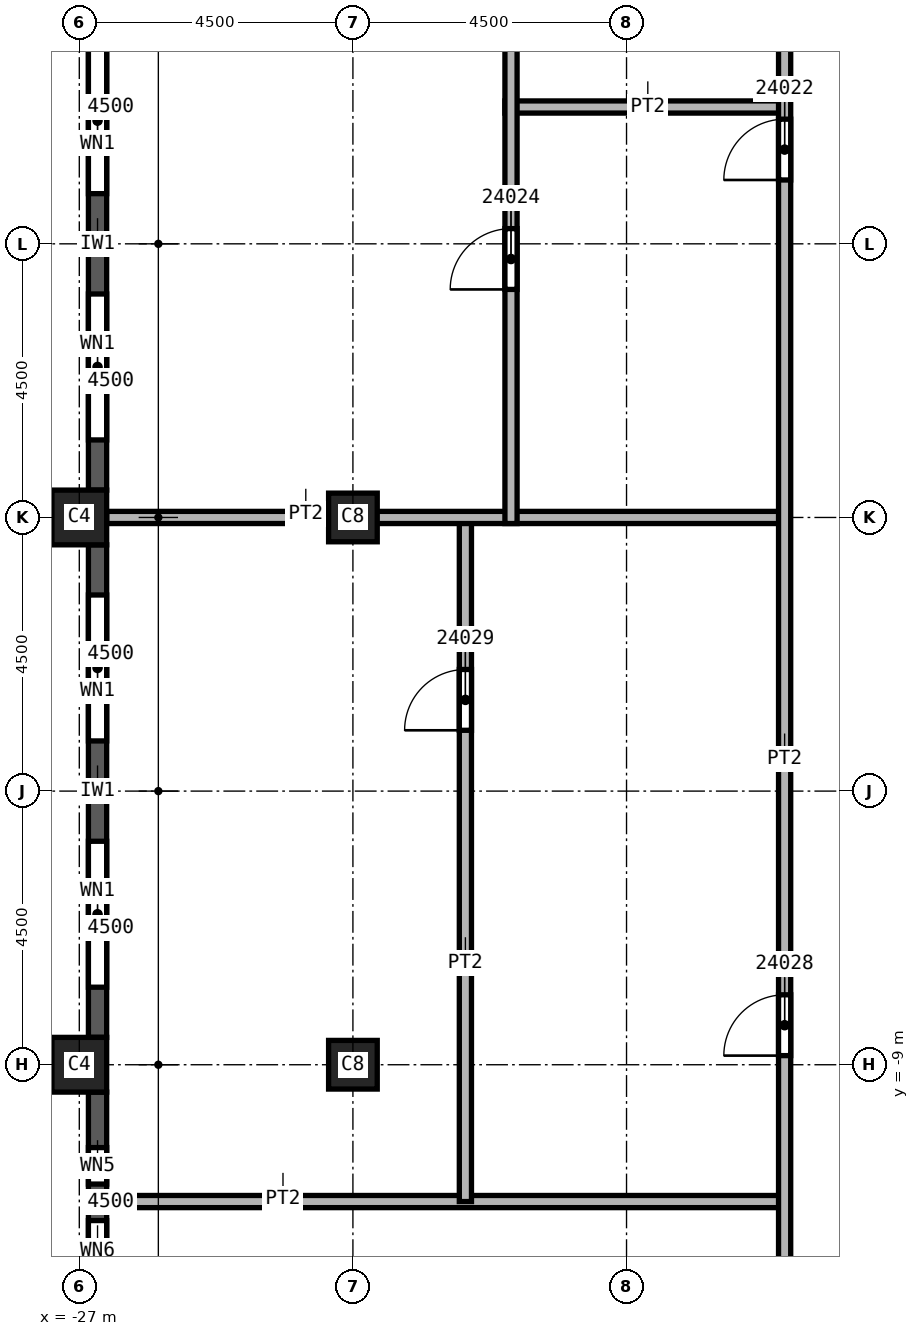
"""IFC4 building model, lengths in metres.
Left out: names, types, materials, properties, quantities, classifications, styles, units other than length and angle.
Written with IfcOpenShell. Run it as: python <this file> out.ifc"""

import sys

from ifc_helpers import new_model, si_unit, direction, frame, frame_2d, origin, origin_2d, place, context, subcontext, project, spatial, rectangle, extrude, element, fill, save


model = new_model("IFC4")
c1 = context("Model", 3, precision=1e-05, world=origin(), true_north=direction((0.0, 1.0)))
c2 = subcontext(c1, "Body", "Model", "MODEL_VIEW")
j1 = project(units=[si_unit("LENGTHUNIT", "METRE"), si_unit("PLANEANGLEUNIT", "RADIAN")], contexts=[c1])
p1 = place(None, origin())
s1 = spatial("IfcSite", under=j1, at=p1, CompositionType="ELEMENT")
p2 = place(p1, origin())
s2 = spatial("IfcBuilding", under=s1, at=p2, CompositionType="ELEMENT")
p3 = place(p2, frame((0.0, 0.0, 338.0)))
s3 = spatial("IfcBuildingStorey", under=s2, at=p3, CompositionType="ELEMENT", Elevation=338.0)
for number, where, z_axis, x_axis in (
    (1, (-22.5, 0.0, 0.0), (0.0, 0.0, 1.0), (1.0, 0.0, 0.0)),
    (2, (-22.5, -9.0, 0.0), (0.0, 0.0, 1.0), (1.0, 0.0, 0.0)),
):
    element("IfcColumn", number, at=place(p3, frame(where, z_axis=z_axis, x_axis=x_axis)), inside=s3, PredefinedType="COLUMN", context=c2, shape_type="SweptSolid", body=[
        extrude(rectangle(XDim=0.8, YDim=0.8, at=origin_2d()), origin(), (0.0, 0.0, 1.0), 3.74),
    ])
for number, where, z_axis, x_axis in (
    (3, (-27.0, 0.0, 0.0), (0.0, 0.0, 1.0), (0.0, 1.0, 0.0)),
    (4, (-27.0, -9.0, 0.0), (0.0, 0.0, 1.0), (0.0, 1.0, 0.0)),
):
    element("IfcColumn", number, at=place(p3, frame(where, z_axis=z_axis, x_axis=x_axis)), inside=s3, PredefinedType="COLUMN", context=c2, shape_type="SweptSolid", body=[
        extrude(rectangle(XDim=0.9, YDim=0.9, at=origin_2d()), origin(), (0.0, 0.0, 1.0), 3.74),
    ])
p4 = place(p3, frame((-26.7, 8.55, 0.0), z_axis=(0.0, 0.0, 1.0), x_axis=(0.0, -1.0, 0.0)))
e5 = element("IfcWall", 5, at=p4, inside=s3, PredefinedType="SOLIDWALL", context=c2, shape_type="SweptSolid", body=[
    extrude(rectangle(XDim=8.1, YDim=0.3, at=frame_2d((4.05, 0.0))), origin(), (0.0, 0.0, 1.0), 3.14),
])
p5 = place(p4, frame((0.825, 0.0, 0.8)))
e6 = element("IfcOpeningElement", 6, at=p5, cuts=e5, PredefinedType="OPENING", context=c2, shape_type="SweptSolid", body=[
    extrude(rectangle(XDim=2.4, YDim=1.95, at=frame_2d((1.2, 0.975))), frame((0.0, 0.15, 0.0), z_axis=(0.0, -1.0, 0.0), x_axis=(1.0, 0.0, 0.0)), (0.0, 0.0, 1.0), 0.3),
])
p6 = place(p4, frame((4.875, 0.0, 0.8)))
e7 = element("IfcOpeningElement", 7, at=p6, cuts=e5, PredefinedType="OPENING", context=c2, shape_type="SweptSolid", body=[
    extrude(rectangle(XDim=2.4, YDim=1.95, at=frame_2d((1.2, 0.975))), frame((0.0, 0.15, 0.0), z_axis=(0.0, -1.0, 0.0), x_axis=(1.0, 0.0, 0.0)), (0.0, 0.0, 1.0), 0.3),
])
p7 = place(p3, frame((-26.7, -0.45, 0.0), z_axis=(0.0, 0.0, 1.0), x_axis=(0.0, -1.0, 0.0)))
e8 = element("IfcWall", 8, at=p7, inside=s3, PredefinedType="SOLIDWALL", context=c2, shape_type="SweptSolid", body=[
    extrude(rectangle(XDim=8.1, YDim=0.3, at=frame_2d((4.05, 0.0))), origin(), (0.0, 0.0, 1.0), 3.14),
])
p8 = place(p7, frame((0.825, 0.0, 0.8)))
e9 = element("IfcOpeningElement", 9, at=p8, cuts=e8, PredefinedType="OPENING", context=c2, shape_type="SweptSolid", body=[
    extrude(rectangle(XDim=2.4, YDim=1.95, at=frame_2d((1.2, 0.975))), frame((0.0, 0.15, 0.0), z_axis=(0.0, -1.0, 0.0), x_axis=(1.0, 0.0, 0.0)), (0.0, 0.0, 1.0), 0.3),
])
p9 = place(p7, frame((4.875, 0.0, 0.8)))
e10 = element("IfcOpeningElement", 10, at=p9, cuts=e8, PredefinedType="OPENING", context=c2, shape_type="SweptSolid", body=[
    extrude(rectangle(XDim=2.4, YDim=1.95, at=frame_2d((1.2, 0.975))), frame((0.0, 0.15, 0.0), z_axis=(0.0, -1.0, 0.0), x_axis=(1.0, 0.0, 0.0)), (0.0, 0.0, 1.0), 0.3),
])
p10 = place(p3, frame((-26.7, -9.45, 0.0), z_axis=(0.0, 0.0, 1.0), x_axis=(0.0, -1.0, 0.0)))
e11 = element("IfcWall", 11, at=p10, inside=s3, PredefinedType="SOLIDWALL", context=c2, shape_type="SweptSolid", body=[
    extrude(rectangle(XDim=8.1, YDim=0.3, at=frame_2d((4.05, 0.0))), origin(), (0.0, 0.0, 1.0), 3.14),
])
p11 = place(p10, frame((0.913, 0.0, 0.8)))
e12 = element("IfcOpeningElement", 12, at=p11, cuts=e11, PredefinedType="OPENING", context=c2, shape_type="SweptSolid", body=[
    extrude(rectangle(XDim=0.6, YDim=1.95, at=frame_2d((0.3, 0.975))), frame((0.0, 0.15, 0.0), z_axis=(0.0, -1.0, 0.0), x_axis=(1.0, 0.0, 0.0)), (0.0, 0.0, 1.0), 0.3),
])
p12 = place(p10, frame((2.113, 0.0, 0.8)))
e13 = element("IfcOpeningElement", 13, at=p12, cuts=e11, PredefinedType="OPENING", context=c2, shape_type="SweptSolid", body=[
    extrude(rectangle(XDim=1.0, YDim=1.95, at=frame_2d((0.5, 0.975))), frame((0.0, 0.15, 0.0), z_axis=(0.0, -1.0, 0.0), x_axis=(1.0, 0.0, 0.0)), (0.0, 0.0, 1.0), 0.3),
])
p13 = place(p10, frame((4.988, 0.0, 0.8)))
e14 = element("IfcOpeningElement", 14, at=p13, cuts=e11, PredefinedType="OPENING", context=c2, shape_type="SweptSolid", body=[
    extrude(rectangle(XDim=1.0, YDim=1.95, at=frame_2d((0.5, 0.975))), frame((0.0, 0.15, 0.0), z_axis=(0.0, -1.0, 0.0), x_axis=(1.0, 0.0, 0.0)), (0.0, 0.0, 1.0), 0.3),
])
p14 = place(p10, frame((6.587, 0.0, 0.8)))
e15 = element("IfcOpeningElement", 15, at=p14, cuts=e11, PredefinedType="OPENING", context=c2, shape_type="SweptSolid", body=[
    extrude(rectangle(XDim=0.6, YDim=1.95, at=frame_2d((0.3, 0.975))), frame((0.0, 0.15, 0.0), z_axis=(0.0, -1.0, 0.0), x_axis=(1.0, 0.0, 0.0)), (0.0, 0.0, 1.0), 0.3),
])
p15 = place(p3, frame((-26.55, -11.25, 0.0), z_axis=(0.0, 0.0, 1.0), x_axis=(1.0, 0.0, 0.0)))
e16 = element("IfcWall", 16, at=p15, inside=s3, PredefinedType="PARTITIONING", context=c2, shape_type="SweptSolid", body=[
    extrude(rectangle(XDim=11.15, YDim=0.2, at=frame_2d((5.575, 0.0))), origin(), (0.0, 0.0, 1.0), 3.74),
])
p16 = place(p3, frame((-20.65, -11.25, 0.0), z_axis=(0.0, 0.0, 1.0), x_axis=(0.0, 1.0, 0.0)))
e17 = element("IfcWall", 17, at=p16, inside=s3, PredefinedType="PARTITIONING", context=c2, shape_type="SweptSolid", body=[
    extrude(rectangle(XDim=11.25, YDim=0.2, at=frame_2d((5.625, 0.0))), origin(), (0.0, 0.0, 1.0), 3.74),
])
p17 = place(p16, frame((7.75, 0.0, 0.0)))
e18 = element("IfcOpeningElement", 18, at=p17, cuts=e17, PredefinedType="OPENING", context=c2, shape_type="SweptSolid", body=[
    extrude(rectangle(XDim=1.0, YDim=2.1, at=frame_2d((0.5, 1.05))), frame((0.0, 0.1, 0.0), z_axis=(0.0, -1.0, 0.0), x_axis=(1.0, 0.0, 0.0)), (0.0, 0.0, 1.0), 0.2),
])
p18 = place(p3, frame((-15.4, 0.0, 0.0), z_axis=(0.0, 0.0, 1.0), x_axis=(-1.0, 0.0, 0.0)))
e19 = element("IfcWall", 19, at=p18, inside=s3, PredefinedType="PARTITIONING", context=c2, shape_type="SweptSolid", body=[
    extrude(rectangle(XDim=11.15, YDim=0.2, at=frame_2d((5.575, 0.0))), origin(), (0.0, 0.0, 1.0), 3.74),
])
p19 = place(p3, frame((-20.0, 6.75, 0.0), z_axis=(0.0, 0.0, 1.0), x_axis=(1.0, 0.0, 0.0)))
e20 = element("IfcWall", 20, at=p19, inside=s3, PredefinedType="PARTITIONING", context=c2, shape_type="SweptSolid", body=[
    extrude(rectangle(XDim=4.6, YDim=0.2, at=frame_2d((2.3, 0.0))), origin(), (0.0, 0.0, 1.0), 3.74),
])
p20 = place(p3, frame((-19.9, -0.1, 0.0), z_axis=(0.0, 0.0, 1.0), x_axis=(0.0, 1.0, 0.0)))
e21 = element("IfcWall", 21, at=p20, inside=s3, PredefinedType="PARTITIONING", context=c2, shape_type="SweptSolid", body=[
    extrude(rectangle(XDim=13.6, YDim=0.2, at=frame_2d((6.8, 0.0))), origin(), (0.0, 0.0, 1.0), 3.74),
])
p21 = place(p20, frame((3.85, 0.0, 0.0)))
e22 = element("IfcOpeningElement", 22, at=p21, cuts=e21, PredefinedType="OPENING", context=c2, shape_type="SweptSolid", body=[
    extrude(rectangle(XDim=1.0, YDim=2.1, at=frame_2d((0.5, 1.05))), frame((0.0, 0.1, 0.0), z_axis=(0.0, -1.0, 0.0), x_axis=(1.0, 0.0, 0.0)), (0.0, 0.0, 1.0), 0.2),
])
p22 = place(p3, frame((-15.4, -24.95, 0.0), z_axis=(0.0, 0.0, 1.0), x_axis=(0.0, 1.0, 0.0)))
e23 = element("IfcWall", 23, at=p22, inside=s3, PredefinedType="PARTITIONING", context=c2, shape_type="SweptSolid", body=[
    extrude(rectangle(XDim=38.55, YDim=0.2, at=frame_2d((19.275, 0.0))), origin(), (0.0, 0.0, 1.0), 3.74),
])
p23 = place(p22, frame((30.5, 0.0, 0.0)))
e24 = element("IfcOpeningElement", 24, at=p23, cuts=e23, PredefinedType="OPENING", context=c2, shape_type="SweptSolid", body=[
    extrude(rectangle(XDim=1.0, YDim=2.1, at=frame_2d((0.5, 1.05))), frame((0.0, 0.1, 0.0), z_axis=(0.0, -1.0, 0.0), x_axis=(1.0, 0.0, 0.0)), (0.0, 0.0, 1.0), 0.2),
])
p24 = place(p22, frame((36.35, 0.0, 0.0)))
e25 = element("IfcOpeningElement", 25, at=p24, cuts=e23, PredefinedType="OPENING", context=c2, shape_type="SweptSolid", body=[
    extrude(rectangle(XDim=1.0, YDim=2.1, at=frame_2d((0.5, 1.05))), frame((0.0, 0.1, 0.0), z_axis=(0.0, -1.0, 0.0), x_axis=(1.0, 0.0, 0.0)), (0.0, 0.0, 1.0), 0.2),
])
p25 = place(p22, frame((1.9, 0.0, 0.0)))
e26 = element("IfcOpeningElement", 26, at=p25, cuts=e23, PredefinedType="OPENING", context=c2, shape_type="SweptSolid", body=[
    extrude(rectangle(XDim=1.0, YDim=2.1, at=frame_2d((0.5, 1.05))), frame((0.0, 0.1, 0.0), z_axis=(0.0, -1.0, 0.0), x_axis=(1.0, 0.0, 0.0)), (0.0, 0.0, 1.0), 0.2),
])
p26 = place(p22, frame((5.6, 0.0, 0.0)))
e27 = element("IfcOpeningElement", 27, at=p26, cuts=e23, PredefinedType="OPENING", context=c2, shape_type="SweptSolid", body=[
    extrude(rectangle(XDim=1.0, YDim=2.1, at=frame_2d((0.5, 1.05))), frame((0.0, 0.1, 0.0), z_axis=(0.0, -1.0, 0.0), x_axis=(1.0, 0.0, 0.0)), (0.0, 0.0, 1.0), 0.2),
])
p27 = place(p22, frame((9.35, 0.0, 0.0)))
e28 = element("IfcOpeningElement", 28, at=p27, cuts=e23, PredefinedType="OPENING", context=c2, shape_type="SweptSolid", body=[
    extrude(rectangle(XDim=1.0, YDim=2.1, at=frame_2d((0.5, 1.05))), frame((0.0, 0.1, 0.0), z_axis=(0.0, -1.0, 0.0), x_axis=(1.0, 0.0, 0.0)), (0.0, 0.0, 1.0), 0.2),
])
p28 = place(p22, frame((16.1, 0.0, 0.0)))
e29 = element("IfcOpeningElement", 29, at=p28, cuts=e23, PredefinedType="OPENING", context=c2, shape_type="SweptSolid", body=[
    extrude(rectangle(XDim=1.0, YDim=2.1, at=frame_2d((0.5, 1.05))), frame((0.0, 0.1, 0.0), z_axis=(0.0, -1.0, 0.0), x_axis=(1.0, 0.0, 0.0)), (0.0, 0.0, 1.0), 0.2),
])
p29 = place(p5, origin())
e30 = element("IfcWindow", 30, at=p29, inside=s3, PartitioningType="SINGLE_PANEL", PredefinedType="WINDOW", context=c2, shape_type="SweptSolid", body=[
    extrude(rectangle(XDim=2.4, YDim=1.95, at=frame_2d((1.2, 0.975))), frame((0.0, 0.03, 0.0), z_axis=(0.0, -1.0, 0.0), x_axis=(1.0, 0.0, 0.0)), (0.0, 0.0, 1.0), 0.06),
])
fill(e6, e30)
p30 = place(p6, origin())
e31 = element("IfcWindow", 31, at=p30, inside=s3, PartitioningType="SINGLE_PANEL", PredefinedType="WINDOW", context=c2, shape_type="SweptSolid", body=[
    extrude(rectangle(XDim=2.4, YDim=1.95, at=frame_2d((1.2, 0.975))), frame((0.0, 0.03, 0.0), z_axis=(0.0, -1.0, 0.0), x_axis=(1.0, 0.0, 0.0)), (0.0, 0.0, 1.0), 0.06),
])
fill(e7, e31)
p31 = place(p8, origin())
e32 = element("IfcWindow", 32, at=p31, inside=s3, PartitioningType="SINGLE_PANEL", PredefinedType="WINDOW", context=c2, shape_type="SweptSolid", body=[
    extrude(rectangle(XDim=2.4, YDim=1.95, at=frame_2d((1.2, 0.975))), frame((0.0, 0.03, 0.0), z_axis=(0.0, -1.0, 0.0), x_axis=(1.0, 0.0, 0.0)), (0.0, 0.0, 1.0), 0.06),
])
fill(e9, e32)
p32 = place(p9, origin())
e33 = element("IfcWindow", 33, at=p32, inside=s3, PartitioningType="SINGLE_PANEL", PredefinedType="WINDOW", context=c2, shape_type="SweptSolid", body=[
    extrude(rectangle(XDim=2.4, YDim=1.95, at=frame_2d((1.2, 0.975))), frame((0.0, 0.03, 0.0), z_axis=(0.0, -1.0, 0.0), x_axis=(1.0, 0.0, 0.0)), (0.0, 0.0, 1.0), 0.06),
])
fill(e10, e33)
p33 = place(p23, origin())
e34 = element("IfcDoor", 34, at=p33, inside=s3, OperationType="SINGLE_SWING_LEFT", PredefinedType="DOOR", context=c2, shape_type="SweptSolid", body=[
    extrude(rectangle(XDim=1.0, YDim=2.1, at=frame_2d((0.5, 1.05))), frame((0.0, 0.025, 0.0), z_axis=(0.0, -1.0, 0.0), x_axis=(1.0, 0.0, 0.0)), (0.0, 0.0, 1.0), 0.05),
])
fill(e24, e34)
p34 = place(p21, origin())
e35 = element("IfcDoor", 35, at=p34, inside=s3, OperationType="SINGLE_SWING_LEFT", PredefinedType="DOOR", context=c2, shape_type="SweptSolid", body=[
    extrude(rectangle(XDim=1.0, YDim=2.1, at=frame_2d((0.5, 1.05))), frame((0.0, 0.025, 0.0), z_axis=(0.0, -1.0, 0.0), x_axis=(1.0, 0.0, 0.0)), (0.0, 0.0, 1.0), 0.05),
])
fill(e22, e35)
p35 = place(p28, origin())
e36 = element("IfcDoor", 36, at=p35, inside=s3, OperationType="SINGLE_SWING_LEFT", PredefinedType="DOOR", context=c2, shape_type="SweptSolid", body=[
    extrude(rectangle(XDim=1.0, YDim=2.1, at=frame_2d((0.5, 1.05))), frame((0.0, 0.025, 0.0), z_axis=(0.0, -1.0, 0.0), x_axis=(1.0, 0.0, 0.0)), (0.0, 0.0, 1.0), 0.05),
])
fill(e29, e36)
p36 = place(p17, origin())
e37 = element("IfcDoor", 37, at=p36, inside=s3, OperationType="SINGLE_SWING_RIGHT", PredefinedType="DOOR", context=c2, shape_type="SweptSolid", body=[
    extrude(rectangle(XDim=1.0, YDim=2.1, at=frame_2d((0.5, 1.05))), frame((0.0, 0.025, 0.0), z_axis=(0.0, -1.0, 0.0), x_axis=(1.0, 0.0, 0.0)), (0.0, 0.0, 1.0), 0.05),
])
fill(e18, e37)
p37 = place(p11, origin())
e38 = element("IfcWindow", 38, at=p37, inside=s3, PartitioningType="SINGLE_PANEL", PredefinedType="WINDOW", context=c2, shape_type="SweptSolid", body=[
    extrude(rectangle(XDim=0.6, YDim=1.95, at=frame_2d((0.3, 0.975))), frame((0.0, 0.03, 0.0), z_axis=(0.0, -1.0, 0.0), x_axis=(1.0, 0.0, 0.0)), (0.0, 0.0, 1.0), 0.06),
])
fill(e12, e38)
p38 = place(p12, origin())
e39 = element("IfcWindow", 39, at=p38, inside=s3, PartitioningType="SINGLE_PANEL", PredefinedType="WINDOW", context=c2, shape_type="SweptSolid", body=[
    extrude(rectangle(XDim=1.0, YDim=1.95, at=frame_2d((0.5, 0.975))), frame((0.0, 0.03, 0.0), z_axis=(0.0, -1.0, 0.0), x_axis=(1.0, 0.0, 0.0)), (0.0, 0.0, 1.0), 0.06),
])
fill(e13, e39)
save(model, sys.argv[1])
